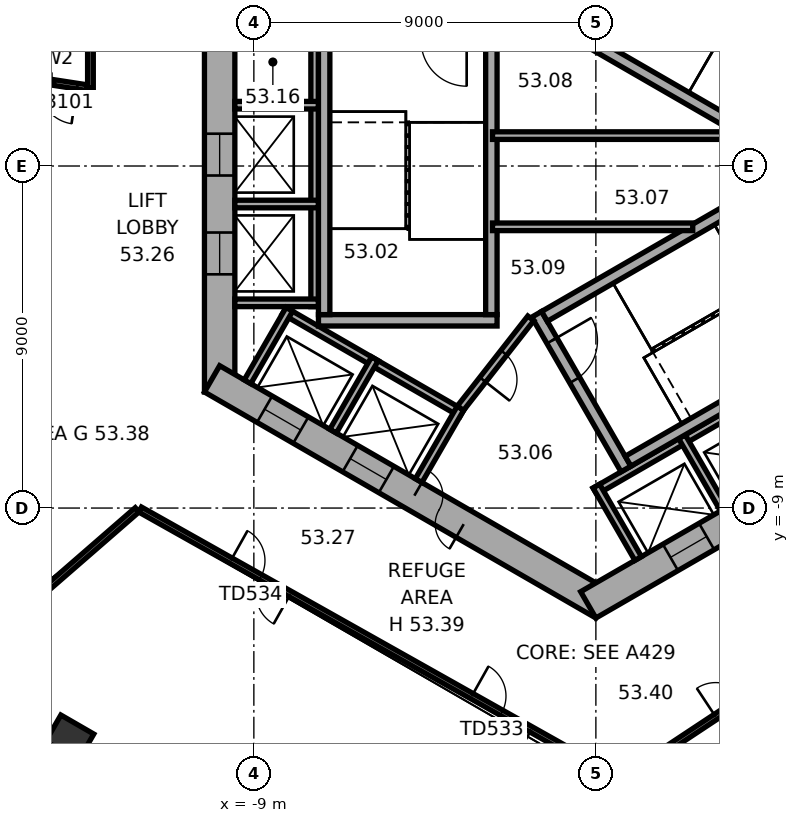
"""IFC4 building model, lengths in metres.
Left out: names, types, materials, properties, quantities, classifications, styles, units other than length and angle.
Written with IfcOpenShell. Run it as: python <this file> out.ifc"""

import sys

from ifc_helpers import new_model, si_unit, direction, frame, frame_2d, origin, origin_2d, place, context, subcontext, project, spatial, rectangle, extrude, element, fill, save


model = new_model("IFC4")
c1 = context("Model", 3, precision=1e-05, world=origin(), true_north=direction((0.0, 1.0)))
c2 = subcontext(c1, "Body", "Model", "MODEL_VIEW")
j1 = project(units=[si_unit("LENGTHUNIT", "METRE"), si_unit("PLANEANGLEUNIT", "RADIAN")], contexts=[c1])
p1 = place(None, origin())
s1 = spatial("IfcSite", under=j1, at=p1, CompositionType="ELEMENT")
p2 = place(p1, origin())
s2 = spatial("IfcBuilding", under=s1, at=p2, CompositionType="ELEMENT")
p3 = place(p2, frame((0.0, 0.0, 214.3)))
s3 = spatial("IfcBuildingStorey", under=s2, at=p3, CompositionType="ELEMENT", Elevation=214.3)
p4 = place(p3, frame((-13.845, -15.042, 0.0), z_axis=(0.0, 0.0, 1.0), x_axis=(0.866025403784, -0.5, 0.0)))
e1 = element("IfcColumn", 1, at=p4, inside=s3, PredefinedType="COLUMN", context=c2, shape_type="SweptSolid", body=[
    extrude(rectangle(XDim=1.0, YDim=0.8, at=origin_2d()), origin(), (0.0, 0.0, 1.0), 7.4),
])
p5 = place(p3, frame((-9.9, 5.947, 0.0), z_axis=(0.0, 0.0, 1.0), x_axis=(0.0, -1.0, 0.0)))
e2 = element("IfcWall", 2, at=p5, inside=s3, PredefinedType="SHEAR", context=c2, shape_type="SweptSolid", body=[
    extrude(rectangle(XDim=11.894, YDim=0.8, at=frame_2d((5.947, 0.0))), origin(), (0.0, 0.0, 1.0), 7.4),
])
p6 = place(p5, frame((5.097, 0.0, 0.0)))
e3 = element("IfcOpeningElement", 3, at=p6, cuts=e2, PredefinedType="OPENING", context=c2, shape_type="SweptSolid", body=[
    extrude(rectangle(XDim=1.1, YDim=2.1, at=frame_2d((0.55, 1.05))), frame((0.0, 0.41, 0.0), z_axis=(0.0, -1.0, 0.0), x_axis=(1.0, 0.0, 0.0)), (0.0, 0.0, 1.0), 0.82),
])
p7 = place(p5, frame((7.697, 0.0, 0.0)))
e4 = element("IfcOpeningElement", 4, at=p7, cuts=e2, PredefinedType="OPENING", context=c2, shape_type="SweptSolid", body=[
    extrude(rectangle(XDim=1.1, YDim=2.1, at=frame_2d((0.55, 1.05))), frame((0.0, 0.41, 0.0), z_axis=(0.0, -1.0, 0.0), x_axis=(1.0, 0.0, 0.0)), (0.0, 0.0, 1.0), 0.82),
])
p8 = place(p3, frame((-10.1, -5.6, 0.0), z_axis=(0.0, 0.0, 1.0), x_axis=(0.866023897231, -0.500002609418, 0.0)))
e5 = element("IfcWall", 5, at=p8, inside=s3, PredefinedType="SHEAR", context=c2, shape_type="SweptSolid", body=[
    extrude(rectangle(XDim=11.894, YDim=0.8, at=frame_2d((5.947, 0.0))), origin(), (0.0, 0.0, 1.0), 7.4),
])
p9 = place(p8, frame((6.147, 0.0, 0.0)))
e6 = element("IfcOpeningElement", 6, at=p9, cuts=e5, PredefinedType="OPENING", context=c2, shape_type="SweptSolid", body=[
    extrude(rectangle(XDim=1.5, YDim=2.1, at=frame_2d((0.75, 1.05))), frame((0.0, 0.41, 0.0), z_axis=(0.0, -1.0, 0.0), x_axis=(1.0, 0.0, 0.0)), (0.0, 0.0, 1.0), 0.82),
])
p10 = place(p8, frame((1.597, 0.0, 0.0)))
e7 = element("IfcOpeningElement", 7, at=p10, cuts=e5, PredefinedType="OPENING", context=c2, shape_type="SweptSolid", body=[
    extrude(rectangle(XDim=1.1, YDim=2.1, at=frame_2d((0.55, 1.05))), frame((0.0, 0.41, 0.0), z_axis=(0.0, -1.0, 0.0), x_axis=(1.0, 0.0, 0.0)), (0.0, 0.0, 1.0), 0.82),
])
p11 = place(p8, frame((4.197, 0.0, 0.0)))
e8 = element("IfcOpeningElement", 8, at=p11, cuts=e5, PredefinedType="OPENING", context=c2, shape_type="SweptSolid", body=[
    extrude(rectangle(XDim=1.1, YDim=2.1, at=frame_2d((0.55, 1.05))), frame((0.0, 0.41, 0.0), z_axis=(0.0, -1.0, 0.0), x_axis=(1.0, 0.0, 0.0)), (0.0, 0.0, 1.0), 0.82),
])
p12 = place(p3, frame((-0.2, -11.547, 0.0), z_axis=(0.0, 0.0, 1.0), x_axis=(0.866023897231, 0.500002609418, 0.0)))
e9 = element("IfcWall", 9, at=p12, inside=s3, PredefinedType="SHEAR", context=c2, shape_type="SweptSolid", body=[
    extrude(rectangle(XDim=11.894, YDim=0.8, at=frame_2d((5.947, 0.0))), origin(), (0.0, 0.0, 1.0), 7.4),
])
p13 = place(p12, frame((2.497, 0.0, 0.0)))
e10 = element("IfcOpeningElement", 10, at=p13, cuts=e9, PredefinedType="OPENING", context=c2, shape_type="SweptSolid", body=[
    extrude(rectangle(XDim=1.1, YDim=2.1, at=frame_2d((0.55, 1.05))), frame((0.0, 0.41, 0.0), z_axis=(0.0, -1.0, 0.0), x_axis=(1.0, 0.0, 0.0)), (0.0, 0.0, 1.0), 0.82),
])
p14 = place(p12, frame((5.097, 0.0, 0.0)))
e11 = element("IfcOpeningElement", 11, at=p14, cuts=e9, PredefinedType="OPENING", context=c2, shape_type="SweptSolid", body=[
    extrude(rectangle(XDim=1.1, YDim=2.1, at=frame_2d((0.55, 1.05))), frame((0.0, 0.41, 0.0), z_axis=(0.0, -1.0, 0.0), x_axis=(1.0, 0.0, 0.0)), (0.0, 0.0, 1.0), 0.82),
])
p15 = place(p12, frame((7.697, 0.0, 0.0)))
e12 = element("IfcOpeningElement", 12, at=p15, cuts=e9, PredefinedType="OPENING", context=c2, shape_type="SweptSolid", body=[
    extrude(rectangle(XDim=1.1, YDim=2.1, at=frame_2d((0.55, 1.05))), frame((0.0, 0.41, 0.0), z_axis=(0.0, -1.0, 0.0), x_axis=(1.0, 0.0, 0.0)), (0.0, 0.0, 1.0), 0.82),
])
p16 = place(p3, frame((13.44, -7.683, 0.0), z_axis=(0.0, 0.0, 1.0), x_axis=(-0.833878347594, -0.551948277844, 0.0)))
e13 = element("IfcWall", 13, at=p16, inside=s3, PredefinedType="STANDARD", context=c2, shape_type="SweptSolid", body=[
    extrude(rectangle(XDim=15.249, YDim=0.15, at=frame_2d((7.625, 0.0))), origin(), (0.0, 0.0, 1.0), 2.6),
])
p17 = place(p16, frame((2.912, 0.0, 0.0)))
e14 = element("IfcOpeningElement", 14, at=p17, cuts=e13, PredefinedType="OPENING", context=c2, shape_type="SweptSolid", body=[
    extrude(rectangle(XDim=1.8, YDim=2.4, at=frame_2d((0.9, 1.2))), frame((0.0, 0.085, 0.0), z_axis=(0.0, -1.0, 0.0), x_axis=(1.0, 0.0, 0.0)), (0.0, 0.0, 1.0), 0.17),
])
p18 = place(p16, frame((10.537, 0.0, 0.0)))
e15 = element("IfcOpeningElement", 15, at=p18, cuts=e13, PredefinedType="OPENING", context=c2, shape_type="SweptSolid", body=[
    extrude(rectangle(XDim=1.8, YDim=2.4, at=frame_2d((0.9, 1.2))), frame((0.0, 0.085, 0.0), z_axis=(0.0, -1.0, 0.0), x_axis=(1.0, 0.0, 0.0)), (0.0, 0.0, 1.0), 0.17),
])
p19 = place(p3, frame((0.69, -16.171, 0.0), z_axis=(0.0, 0.0, 1.0), x_axis=(-0.871655280677, 0.490119446326, 0.0)))
e16 = element("IfcWall", 16, at=p19, inside=s3, PredefinedType="STANDARD", context=c2, shape_type="SweptSolid", body=[
    extrude(rectangle(XDim=14.552, YDim=0.15, at=frame_2d((7.276, 0.0))), origin(), (0.0, 0.0, 1.0), 2.6),
])
p20 = place(p19, frame((2.738, 0.0, 0.0)))
e17 = element("IfcOpeningElement", 17, at=p20, cuts=e16, PredefinedType="OPENING", context=c2, shape_type="SweptSolid", body=[
    extrude(rectangle(XDim=1.8, YDim=2.4, at=frame_2d((0.9, 1.2))), frame((0.0, 0.085, 0.0), z_axis=(0.0, -1.0, 0.0), x_axis=(1.0, 0.0, 0.0)), (0.0, 0.0, 1.0), 0.17),
])
p21 = place(p19, frame((10.014, 0.0, 0.0)))
e18 = element("IfcOpeningElement", 18, at=p21, cuts=e16, PredefinedType="OPENING", context=c2, shape_type="SweptSolid", body=[
    extrude(rectangle(XDim=1.8, YDim=2.4, at=frame_2d((0.9, 1.2))), frame((0.0, 0.085, 0.0), z_axis=(0.0, -1.0, 0.0), x_axis=(1.0, 0.0, 0.0)), (0.0, 0.0, 1.0), 0.17),
])
p22 = place(p3, frame((-12.072, -9.047, 0.0), z_axis=(0.0, 0.0, 1.0), x_axis=(-0.754779474902, -0.655978615708, 0.0)))
e19 = element("IfcWall", 19, at=p22, inside=s3, PredefinedType="STANDARD", context=c2, shape_type="SweptSolid", body=[
    extrude(rectangle(XDim=5.619, YDim=0.15, at=frame_2d((2.81, 0.0))), origin(), (0.0, 0.0, 1.0), 2.6),
])
p23 = place(p3, frame((-7.4, 4.3, 0.0), z_axis=(0.0, 0.0, 1.0), x_axis=(0.0, -1.0, 0.0)))
e20 = element("IfcWall", 20, at=p23, inside=s3, PredefinedType="PARTITIONING", context=c2, shape_type="SweptSolid", body=[
    extrude(rectangle(XDim=8.0, YDim=0.2, at=frame_2d((4.0, 0.0))), origin(), (0.0, 0.0, 1.0), 7.12),
])
for number, where, z_axis, x_axis in (
    (21, (-7.3, 1.6, 0.0), (0.0, 0.0, 1.0), (-1.0, 0.0, 0.0)),
    (22, (-7.3, -1.0, 0.0), (0.0, 0.0, 1.0), (-1.0, 0.0, 0.0)),
    (23, (-7.3, -3.6, 0.0), (0.0, 0.0, 1.0), (-1.0, 0.0, 0.0)),
):
    element("IfcWall", number, at=place(p3, frame(where, z_axis=z_axis, x_axis=x_axis)), inside=s3, PredefinedType="PARTITIONING", context=c2, shape_type="SweptSolid", body=[
        extrude(rectangle(XDim=2.2, YDim=0.2, at=frame_2d((1.1, 0.0))), origin(), (0.0, 0.0, 1.0), 7.12),
    ])
p24 = place(p3, frame((-8.203, -3.809, 0.0), z_axis=(0.0, 0.0, 1.0), x_axis=(0.866028230842, -0.499995103361, 0.0)))
e24 = element("IfcWall", 24, at=p24, inside=s3, PredefinedType="PARTITIONING", context=c2, shape_type="SweptSolid", body=[
    extrude(rectangle(XDim=5.4, YDim=0.2, at=frame_2d((2.7, 0.0))), origin(), (0.0, 0.0, 1.0), 7.12),
])
for number, where, z_axis, x_axis in (
    (25, (-8.067, -3.772, 0.0), (0.0, 0.0, 1.0), (-0.5, -0.866, 0.0)),
    (26, (-5.815, -5.072, 0.0), (0.0, 0.0, 1.0), (-0.5, -0.866, 0.0)),
):
    element("IfcWall", number, at=place(p3, frame(where, z_axis=z_axis, x_axis=x_axis)), inside=s3, PredefinedType="PARTITIONING", context=c2, shape_type="SweptSolid", body=[
        extrude(rectangle(XDim=2.2, YDim=0.2, at=frame_2d((1.1, 0.0))), origin(), (0.0, 0.0, 1.0), 7.12),
    ])
p25 = place(p3, frame((-3.563, -6.372, 0.0), z_axis=(0.0, 0.0, 1.0), x_axis=(-0.499994660107, -0.866028486751, 0.0)))
e27 = element("IfcWall", 27, at=p25, inside=s3, PredefinedType="PARTITIONING", context=c2, shape_type="SweptSolid", body=[
    extrude(rectangle(XDim=2.2, YDim=0.2, at=frame_2d((1.1, 0.0))), origin(), (0.0, 0.0, 1.0), 7.12),
])
p26 = place(p3, frame((-0.024, -8.559, 0.0), z_axis=(0.0, 0.0, 1.0), x_axis=(0.866026010844, 0.49999894854, 0.0)))
e28 = element("IfcWall", 28, at=p26, inside=s3, PredefinedType="PARTITIONING", context=c2, shape_type="SweptSolid", body=[
    extrude(rectangle(XDim=8.0, YDim=0.2, at=frame_2d((4.0, 0.0))), origin(), (0.0, 0.0, 1.0), 7.12),
])
for number, where, z_axis, x_axis in (
    (29, (0.013, -8.422, 0.0), (0.0, 0.0, 1.0), (0.5, -0.866, 0.0)),
    (30, (2.264, -7.122, 0.0), (0.0, 0.0, 1.0), (0.5, -0.866, 0.0)),
):
    element("IfcWall", number, at=place(p3, frame(where, z_axis=z_axis, x_axis=x_axis)), inside=s3, PredefinedType="PARTITIONING", context=c2, shape_type="SweptSolid", body=[
        extrude(rectangle(XDim=2.2, YDim=0.2, at=frame_2d((1.1, 0.0))), origin(), (0.0, 0.0, 1.0), 7.12),
    ])
p27 = place(p3, frame((4.103, 0.807, 0.0), z_axis=(0.0, 0.0, 1.0), x_axis=(-0.866027801685, 0.499995846692, 0.0)))
e31 = element("IfcWall", 31, at=p27, inside=s3, PredefinedType="SHEAR", context=c2, shape_type="SweptSolid", body=[
    extrude(rectangle(XDim=7.06, YDim=0.3, at=frame_2d((3.53, 0.0))), origin(), (0.0, 0.0, 1.0), 7.12),
])
p28 = place(p3, frame((-2.6, -4.06, 0.0), z_axis=(0.0, 0.0, 1.0), x_axis=(-1.0, 0.0, 0.0)))
e32 = element("IfcWall", 32, at=p28, inside=s3, PredefinedType="SHEAR", context=c2, shape_type="SweptSolid", body=[
    extrude(rectangle(XDim=4.7, YDim=0.3, at=frame_2d((2.35, 0.0))), origin(), (0.0, 0.0, 1.0), 7.12),
])
for number, where, z_axis, x_axis in (
    (33, (-2.75, 3.15, 0.0), (0.0, 0.0, 1.0), (0.0, -1.0, 0.0)),
    (34, (-7.15, 3.15, 0.0), (0.0, 0.0, 1.0), (0.0, -1.0, 0.0)),
):
    element("IfcWall", number, at=place(p3, frame(where, z_axis=z_axis, x_axis=x_axis)), inside=s3, PredefinedType="SHEAR", context=c2, shape_type="SweptSolid", body=[
        extrude(rectangle(XDim=7.06, YDim=0.3, at=frame_2d((3.53, 0.0))), origin(), (0.0, 0.0, 1.0), 7.12),
    ])
p29 = place(p3, frame((-1.558, -3.902, 0.0), z_axis=(0.0, 0.0, 1.0), x_axis=(0.499977259774, -0.866038532462, 0.0)))
e35 = element("IfcWall", 35, at=p29, inside=s3, PredefinedType="SHEAR", context=c2, shape_type="SweptSolid", body=[
    extrude(rectangle(XDim=4.7, YDim=0.3, at=frame_2d((2.35, 0.0))), origin(), (0.0, 0.0, 1.0), 7.12),
])
p30 = place(p29, frame((0.8, 0.0, 0.0)))
e36 = element("IfcOpeningElement", 36, at=p30, cuts=e35, PredefinedType="OPENING", context=c2, shape_type="SweptSolid", body=[
    extrude(rectangle(XDim=1.2, YDim=2.1, at=frame_2d((0.6, 1.05))), frame((0.0, 0.16, 0.0), z_axis=(0.0, -1.0, 0.0), x_axis=(1.0, 0.0, 0.0)), (0.0, 0.0, 1.0), 0.32),
])
for number, where, z_axis, x_axis in (
    (37, (-1.353, -3.957, 0.0), (0.0, 0.0, 1.0), (0.866, 0.5, 0.0)),
    (38, (0.847, -7.767, 0.0), (0.0, 0.0, 1.0), (0.866, 0.5, 0.0)),
):
    element("IfcWall", number, at=place(p3, frame(where, z_axis=z_axis, x_axis=x_axis)), inside=s3, PredefinedType="SHEAR", context=c2, shape_type="SweptSolid", body=[
        extrude(rectangle(XDim=7.06, YDim=0.3, at=frame_2d((3.53, 0.0))), origin(), (0.0, 0.0, 1.0), 7.12),
    ])
p31 = place(p3, frame((-1.712, -4.008, 0.0), z_axis=(0.0, 0.0, 1.0), x_axis=(-0.616549420702, -0.787316208287, 0.0)))
e39 = element("IfcWall", 39, at=p31, inside=s3, PredefinedType="PARTITIONING", context=c2, shape_type="SweptSolid", body=[
    extrude(rectangle(XDim=3.002, YDim=0.2, at=frame_2d((1.501, 0.0))), origin(), (0.0, 0.0, 1.0), 7.12),
])
p32 = place(p31, frame((1.15, 0.0, 0.0)))
e40 = element("IfcOpeningElement", 40, at=p32, cuts=e39, PredefinedType="OPENING", context=c2, shape_type="SweptSolid", body=[
    extrude(rectangle(XDim=0.9, YDim=2.1, at=frame_2d((0.45, 1.05))), frame((0.0, 0.11, 0.0), z_axis=(0.0, -1.0, 0.0), x_axis=(1.0, 0.0, 0.0)), (0.0, 0.0, 1.0), 0.22),
])
p33 = place(p3, frame((-2.72, -1.6, 0.0), z_axis=(0.0, 0.0, 1.0), x_axis=(1.0, 0.0, 0.0)))
e41 = element("IfcWall", 41, at=p33, inside=s3, PredefinedType="PARTITIONING", context=c2, shape_type="SweptSolid", body=[
    extrude(rectangle(XDim=5.269, YDim=0.2, at=frame_2d((2.634, 0.0))), origin(), (0.0, 0.0, 1.0), 7.12),
])
p34 = place(p3, frame((-2.72, 0.8, 0.0), z_axis=(0.0, 0.0, 1.0), x_axis=(1.0, 0.0, 0.0)))
e42 = element("IfcWall", 42, at=p34, inside=s3, PredefinedType="PARTITIONING", context=c2, shape_type="SweptSolid", body=[
    extrude(rectangle(XDim=6.654, YDim=0.2, at=frame_2d((3.327, 0.0))), origin(), (0.0, 0.0, 1.0), 7.12),
])
p35 = place(p3, frame((-13.399, 2.063, 0.0), z_axis=(0.0, 0.0, 1.0), x_axis=(-0.988354850272, 0.152166651878, 0.0)))
e43 = element("IfcWall", 43, at=p35, inside=s3, PredefinedType="PARTITIONING", context=c2, shape_type="SweptSolid", body=[
    extrude(rectangle(XDim=1.844, YDim=0.15, at=frame_2d((0.922, 0.0))), origin(), (0.0, 0.0, 1.0), 7.12),
])
p36 = place(p35, frame((0.25, 0.0, 0.0)))
e44 = element("IfcOpeningElement", 44, at=p36, cuts=e43, PredefinedType="OPENING", context=c2, shape_type="SweptSolid", body=[
    extrude(rectangle(XDim=1.0, YDim=2.1, at=frame_2d((0.5, 1.05))), frame((0.0, 0.085, 0.0), z_axis=(0.0, -1.0, 0.0), x_axis=(1.0, 0.0, 0.0)), (0.0, 0.0, 1.0), 0.17),
])
p37 = place(p3, frame((-13.3, 4.233, 0.0), z_axis=(0.0, 0.0, 1.0), x_axis=(0.0, -1.0, 0.0)))
e45 = element("IfcWall", 45, at=p37, inside=s3, PredefinedType="PARTITIONING", context=c2, shape_type="SweptSolid", body=[
    extrude(rectangle(XDim=2.185, YDim=0.15, at=frame_2d((1.093, 0.0))), origin(), (0.0, 0.0, 1.0), 7.12),
])
p38 = place(p18, origin())
e46 = element("IfcDoor", 46, at=p38, inside=s3, OperationType="DOUBLE_DOOR_DOUBLE_SWING", PredefinedType="DOOR", context=c2, shape_type="SweptSolid", body=[
    extrude(rectangle(XDim=1.8, YDim=2.4, at=frame_2d((0.9, 1.2))), frame((0.0, 0.025, 0.0), z_axis=(0.0, -1.0, 0.0), x_axis=(1.0, 0.0, 0.0)), (0.0, 0.0, 1.0), 0.05),
])
fill(e15, e46)
p39 = place(p20, origin())
e47 = element("IfcDoor", 47, at=p39, inside=s3, OperationType="DOUBLE_DOOR_DOUBLE_SWING", PredefinedType="DOOR", context=c2, shape_type="SweptSolid", body=[
    extrude(rectangle(XDim=1.8, YDim=2.4, at=frame_2d((0.9, 1.2))), frame((0.0, 0.025, 0.0), z_axis=(0.0, -1.0, 0.0), x_axis=(1.0, 0.0, 0.0)), (0.0, 0.0, 1.0), 0.05),
])
fill(e17, e47)
p40 = place(p21, origin())
e48 = element("IfcDoor", 48, at=p40, inside=s3, OperationType="DOUBLE_DOOR_DOUBLE_SWING", PredefinedType="DOOR", context=c2, shape_type="SweptSolid", body=[
    extrude(rectangle(XDim=1.8, YDim=2.4, at=frame_2d((0.9, 1.2))), frame((0.0, 0.025, 0.0), z_axis=(0.0, -1.0, 0.0), x_axis=(1.0, 0.0, 0.0)), (0.0, 0.0, 1.0), 0.05),
])
fill(e18, e48)
p41 = place(p9, origin())
e49 = element("IfcDoor", 49, at=p41, inside=s3, OperationType="DOUBLE_DOOR_SINGLE_SWING", PredefinedType="DOOR", context=c2, shape_type="SweptSolid", body=[
    extrude(rectangle(XDim=1.5, YDim=2.1, at=frame_2d((0.75, 1.05))), frame((0.0, 0.025, 0.0), z_axis=(0.0, -1.0, 0.0), x_axis=(1.0, 0.0, 0.0)), (0.0, 0.0, 1.0), 0.05),
])
fill(e6, e49)
p42 = place(p30, origin())
e50 = element("IfcDoor", 50, at=p42, inside=s3, OperationType="SINGLE_SWING_RIGHT", PredefinedType="DOOR", context=c2, shape_type="SweptSolid", body=[
    extrude(rectangle(XDim=1.2, YDim=2.1, at=frame_2d((0.6, 1.05))), frame((0.0, 0.025, 0.0), z_axis=(0.0, -1.0, 0.0), x_axis=(1.0, 0.0, 0.0)), (0.0, 0.0, 1.0), 0.05),
])
fill(e36, e50)
p43 = place(p32, origin())
e51 = element("IfcDoor", 51, at=p43, inside=s3, OperationType="SINGLE_SWING_LEFT", PredefinedType="DOOR", context=c2, shape_type="SweptSolid", body=[
    extrude(rectangle(XDim=0.9, YDim=2.1, at=frame_2d((0.45, 1.05))), frame((0.0, 0.025, 0.0), z_axis=(0.0, -1.0, 0.0), x_axis=(1.0, 0.0, 0.0)), (0.0, 0.0, 1.0), 0.05),
])
fill(e40, e51)
p44 = place(p6, origin())
e52 = element("IfcDoor", 52, at=p44, inside=s3, OperationType="DOUBLE_DOOR_SLIDING", PredefinedType="DOOR", context=c2, shape_type="SweptSolid", body=[
    extrude(rectangle(XDim=1.1, YDim=2.1, at=frame_2d((0.55, 1.05))), frame((0.0, 0.025, 0.0), z_axis=(0.0, -1.0, 0.0), x_axis=(1.0, 0.0, 0.0)), (0.0, 0.0, 1.0), 0.05),
])
fill(e3, e52)
p45 = place(p7, origin())
e53 = element("IfcDoor", 53, at=p45, inside=s3, OperationType="DOUBLE_DOOR_SLIDING", PredefinedType="DOOR", context=c2, shape_type="SweptSolid", body=[
    extrude(rectangle(XDim=1.1, YDim=2.1, at=frame_2d((0.55, 1.05))), frame((0.0, 0.025, 0.0), z_axis=(0.0, -1.0, 0.0), x_axis=(1.0, 0.0, 0.0)), (0.0, 0.0, 1.0), 0.05),
])
fill(e4, e53)
p46 = place(p10, origin())
e54 = element("IfcDoor", 54, at=p46, inside=s3, OperationType="DOUBLE_DOOR_SLIDING", PredefinedType="DOOR", context=c2, shape_type="SweptSolid", body=[
    extrude(rectangle(XDim=1.1, YDim=2.1, at=frame_2d((0.55, 1.05))), frame((0.0, 0.025, 0.0), z_axis=(0.0, -1.0, 0.0), x_axis=(1.0, 0.0, 0.0)), (0.0, 0.0, 1.0), 0.05),
])
fill(e7, e54)
p47 = place(p11, origin())
e55 = element("IfcDoor", 55, at=p47, inside=s3, OperationType="DOUBLE_DOOR_SLIDING", PredefinedType="DOOR", context=c2, shape_type="SweptSolid", body=[
    extrude(rectangle(XDim=1.1, YDim=2.1, at=frame_2d((0.55, 1.05))), frame((0.0, 0.025, 0.0), z_axis=(0.0, -1.0, 0.0), x_axis=(1.0, 0.0, 0.0)), (0.0, 0.0, 1.0), 0.05),
])
fill(e8, e55)
p48 = place(p13, origin())
e56 = element("IfcDoor", 56, at=p48, inside=s3, OperationType="DOUBLE_DOOR_SLIDING", PredefinedType="DOOR", context=c2, shape_type="SweptSolid", body=[
    extrude(rectangle(XDim=1.1, YDim=2.1, at=frame_2d((0.55, 1.05))), frame((0.0, 0.025, 0.0), z_axis=(0.0, -1.0, 0.0), x_axis=(1.0, 0.0, 0.0)), (0.0, 0.0, 1.0), 0.05),
])
fill(e10, e56)
p49 = place(p36, origin())
e57 = element("IfcDoor", 57, at=p49, inside=s3, OperationType="SINGLE_SWING_LEFT", PredefinedType="DOOR", context=c2, shape_type="SweptSolid", body=[
    extrude(rectangle(XDim=1.0, YDim=2.1, at=frame_2d((0.5, 1.05))), frame((0.0, 0.025, 0.0), z_axis=(0.0, -1.0, 0.0), x_axis=(1.0, 0.0, 0.0)), (0.0, 0.0, 1.0), 0.05),
])
fill(e44, e57)
save(model, sys.argv[1])
